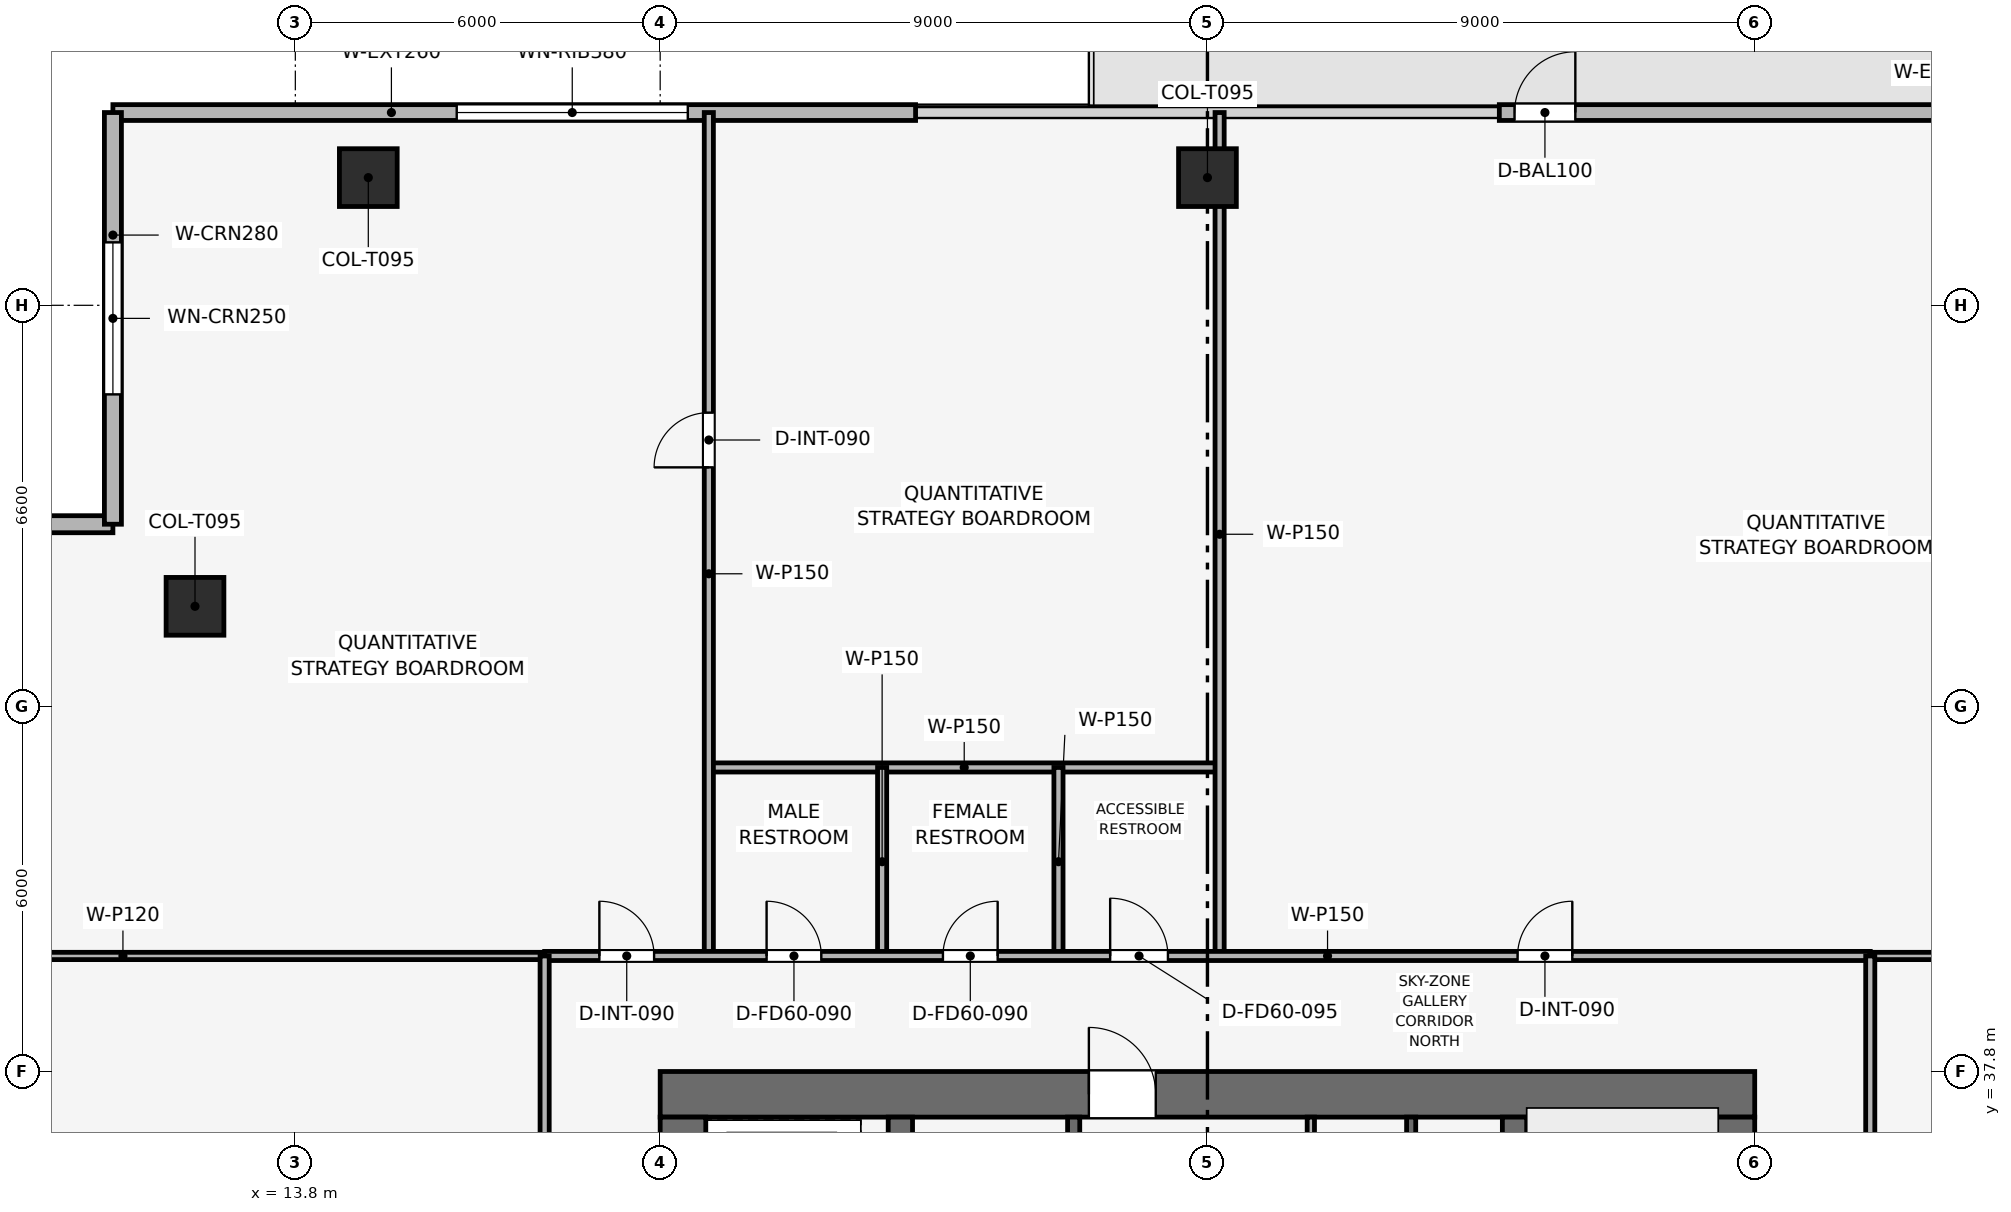
"""IFC4 building model, lengths in metres.
Left out: names, types, materials, properties, quantities, classifications, styles, units other than length and angle.
Written with IfcOpenShell. Run it as: python <this file> out.ifc"""

import sys

from ifc_helpers import new_model, si_unit, direction, frame, frame_2d, origin, origin_2d, place, context, subcontext, project, spatial, rectangle, extrude, element, fill, save


model = new_model("IFC4")
c1 = context("Model", 3, precision=1e-05, world=origin(), true_north=direction((0.0, 1.0)))
c2 = subcontext(c1, "Body", "Model", "MODEL_VIEW")
j1 = project(units=[si_unit("LENGTHUNIT", "METRE"), si_unit("PLANEANGLEUNIT", "RADIAN")], contexts=[c1])
p1 = place(None, origin())
s1 = spatial("IfcSite", under=j1, at=p1, CompositionType="ELEMENT")
p2 = place(p1, origin())
s2 = spatial("IfcBuilding", under=s1, at=p2, CompositionType="ELEMENT")
p3 = place(p2, frame((0.0, 0.0, 265.35)))
s3 = spatial("IfcBuildingStorey", under=s2, at=p3, CompositionType="ELEMENT", Elevation=265.35)
p4 = place(p3, frame((19.8, 37.425, 0.0), z_axis=(0.0, 0.0, 1.0), x_axis=(1.0, 0.0, 0.0)))
e1 = element("IfcWall", 1, at=p4, inside=s3, PredefinedType="SHEAR", context=c2, shape_type="SweptSolid", body=[
    extrude(rectangle(XDim=18.0, YDim=0.75, at=frame_2d((9.0, 0.0))), origin(), (0.0, 0.0, 1.0), 3.75),
])
p5 = place(p4, frame((7.05, 0.0, 0.0)))
e2 = element("IfcOpeningElement", 2, at=p5, cuts=e1, PredefinedType="OPENING", context=c2, shape_type="SweptSolid", body=[
    extrude(rectangle(XDim=1.1, YDim=2.15, at=frame_2d((0.55, 1.075))), frame((0.0, 0.385, 0.0), z_axis=(0.0, -1.0, 0.0), x_axis=(1.0, 0.0, 0.0)), (0.0, 0.0, 1.0), 0.77),
])
p6 = place(p3, frame((20.175, 20.55, 0.0), z_axis=(0.0, 0.0, 1.0), x_axis=(0.0, 1.0, 0.0)))
e3 = element("IfcWall", 3, at=p6, inside=s3, PredefinedType="SHEAR", context=c2, shape_type="SweptSolid", body=[
    extrude(rectangle(XDim=16.5, YDim=0.75, at=frame_2d((8.25, 0.0))), origin(), (0.0, 0.0, 1.0), 3.75),
])
p7 = place(p6, frame((10.25, 0.0, 0.0)))
e4 = element("IfcOpeningElement", 4, at=p7, cuts=e3, PredefinedType="OPENING", context=c2, shape_type="SweptSolid", body=[
    extrude(rectangle(XDim=1.1, YDim=2.15, at=frame_2d((0.55, 1.075))), frame((0.0, 0.385, 0.0), z_axis=(0.0, -1.0, 0.0), x_axis=(1.0, 0.0, 0.0)), (0.0, 0.0, 1.0), 0.77),
])
p8 = place(p3, frame((37.425, 20.55, 0.0), z_axis=(0.0, 0.0, 1.0), x_axis=(0.0, 1.0, 0.0)))
e5 = element("IfcWall", 5, at=p8, inside=s3, PredefinedType="SHEAR", context=c2, shape_type="SweptSolid", body=[
    extrude(rectangle(XDim=16.5, YDim=0.75, at=frame_2d((8.25, 0.0))), origin(), (0.0, 0.0, 1.0), 3.75),
])
p9 = place(p8, frame((4.75, 0.0, 0.0)))
e6 = element("IfcOpeningElement", 6, at=p9, cuts=e5, PredefinedType="OPENING", context=c2, shape_type="SweptSolid", body=[
    extrude(rectangle(XDim=1.1, YDim=2.15, at=frame_2d((0.55, 1.075))), frame((0.0, 0.385, 0.0), z_axis=(0.0, -1.0, 0.0), x_axis=(1.0, 0.0, 0.0)), (0.0, 0.0, 1.0), 0.77),
])
for number, where, z_axis, x_axis in (
    (7, (23.75, 20.55, 0.0), (0.0, 0.0, 1.0), (0.0, 1.0, 0.0)),
    (8, (33.85, 20.55, 0.0), (0.0, 0.0, 1.0), (0.0, 1.0, 0.0)),
):
    element("IfcWall", number, at=place(p3, frame(where, z_axis=z_axis, x_axis=x_axis)), inside=s3, PredefinedType="SHEAR", context=c2, shape_type="SweptSolid", body=[
        extrude(rectangle(XDim=16.5, YDim=0.4, at=frame_2d((8.25, 0.0))), origin(), (0.0, 0.0, 1.0), 3.75),
    ])
for number, where, z_axis, x_axis in (
    (9, (28.8, 52.5, 0.003), (0.0, 0.0, 1.0), (1.0, 0.0, 0.0)),
    (10, (15.0, 52.5, 0.003), (0.0, 0.0, 1.0), (1.0, 0.0, 0.0)),
    (11, (12.15, 45.45, 0.003), (0.0, 0.0, 1.0), (1.0, 0.0, 0.0)),
):
    element("IfcColumn", number, at=place(p3, frame(where, z_axis=z_axis, x_axis=x_axis)), inside=s3, PredefinedType="COLUMN", context=c2, shape_type="SweptSolid", body=[
        extrude(rectangle(XDim=0.95, YDim=0.95, at=origin_2d()), origin(), (0.0, 0.0, 1.0), 3.494),
    ])
p10 = place(p3, frame((10.8, 53.57, 0.0), z_axis=(0.0, 0.0, 1.0), x_axis=(1.0, 0.0, 0.0)))
e12 = element("IfcWall", 12, at=p10, inside=s3, PredefinedType="SOLIDWALL", context=c2, shape_type="SweptSolid", body=[
    extrude(rectangle(XDim=13.2, YDim=0.26, at=frame_2d((6.6, 0.0))), origin(), (0.0, 0.0, 1.0), 3.5),
])
p11 = place(p10, frame((5.654, 0.0, 0.9)))
e13 = element("IfcOpeningElement", 13, at=p11, cuts=e12, PredefinedType="OPENING", context=c2, shape_type="SweptSolid", body=[
    extrude(rectangle(XDim=3.8, YDim=1.9, at=frame_2d((1.9, 0.95))), frame((0.0, 0.14, 0.0), z_axis=(0.0, -1.0, 0.0), x_axis=(1.0, 0.0, 0.0)), (0.0, 0.0, 1.0), 0.28),
])
p12 = place(p3, frame((33.6, 53.57, 0.0), z_axis=(0.0, 0.0, 1.0), x_axis=(1.0, 0.0, 0.0)))
e14 = element("IfcWall", 14, at=p12, inside=s3, PredefinedType="SOLIDWALL", context=c2, shape_type="SweptSolid", body=[
    extrude(rectangle(XDim=13.2, YDim=0.26, at=frame_2d((6.6, 0.0))), origin(), (0.0, 0.0, 1.0), 3.5),
])
p13 = place(p12, frame((0.25, 0.0, 0.0)))
e15 = element("IfcOpeningElement", 15, at=p13, cuts=e14, PredefinedType="OPENING", context=c2, shape_type="SweptSolid", body=[
    extrude(rectangle(XDim=1.0, YDim=2.2, at=frame_2d((0.5, 1.1))), frame((0.0, 0.14, 0.0), z_axis=(0.0, -1.0, 0.0), x_axis=(1.0, 0.0, 0.0)), (0.0, 0.0, 1.0), 0.28),
])
p14 = place(p3, frame((4.03, 46.8, 0.0), z_axis=(0.0, 0.0, 1.0), x_axis=(1.0, 0.0, 0.0)))
e16 = element("IfcWall", 16, at=p14, inside=s3, PredefinedType="SOLIDWALL", context=c2, shape_type="SweptSolid", body=[
    extrude(rectangle(XDim=6.77, YDim=0.28, at=frame_2d((3.385, 0.0))), origin(), (0.0, 0.0, 1.0), 3.5),
])
p15 = place(p14, frame((2.135, 0.0, 0.9)))
e17 = element("IfcOpeningElement", 17, at=p15, cuts=e16, PredefinedType="OPENING", context=c2, shape_type="SweptSolid", body=[
    extrude(rectangle(XDim=2.5, YDim=1.9, at=frame_2d((1.25, 0.95))), frame((0.0, 0.15, 0.0), z_axis=(0.0, -1.0, 0.0), x_axis=(1.0, 0.0, 0.0)), (0.0, 0.0, 1.0), 0.3),
])
p16 = place(p3, frame((10.8, 46.8, 0.0), z_axis=(0.0, 0.0, 1.0), x_axis=(0.0, 1.0, 0.0)))
e18 = element("IfcWall", 18, at=p16, inside=s3, PredefinedType="SOLIDWALL", context=c2, shape_type="SweptSolid", body=[
    extrude(rectangle(XDim=6.77, YDim=0.28, at=frame_2d((3.385, 0.0))), origin(), (0.0, 0.0, 1.0), 3.5),
])
p17 = place(p16, frame((2.135, 0.0, 0.9)))
e19 = element("IfcOpeningElement", 19, at=p17, cuts=e18, PredefinedType="OPENING", context=c2, shape_type="SweptSolid", body=[
    extrude(rectangle(XDim=2.5, YDim=1.9, at=frame_2d((1.25, 0.95))), frame((0.0, 0.15, 0.0), z_axis=(0.0, -1.0, 0.0), x_axis=(1.0, 0.0, 0.0)), (0.0, 0.0, 1.0), 0.3),
])
p18 = place(p3, frame((32.15, 34.0, 0.0), z_axis=(0.0, 0.0, 1.0), x_axis=(0.0, 1.0, 0.0)))
e20 = element("IfcWall", 20, at=p18, inside=s3, PredefinedType="SHEAR", context=c2, shape_type="SweptSolid", body=[
    extrude(rectangle(XDim=3.05, YDim=0.15, at=frame_2d((1.525, 0.0))), origin(), (0.0, 0.0, 1.0), 3.5),
])
p19 = place(p3, frame((26.6, 34.0, 0.0), z_axis=(0.0, 0.0, 1.0), x_axis=(0.0, 1.0, 0.0)))
e21 = element("IfcWall", 21, at=p19, inside=s3, PredefinedType="SHEAR", context=c2, shape_type="SweptSolid", body=[
    extrude(rectangle(XDim=3.05, YDim=0.2, at=frame_2d((1.525, 0.0))), origin(), (0.0, 0.0, 1.0), 3.5),
])
p20 = place(p19, frame((0.75, 0.0, 0.0)))
e22 = element("IfcOpeningElement", 22, at=p20, cuts=e21, PredefinedType="OPENING", context=c2, shape_type="SweptSolid", body=[
    extrude(rectangle(XDim=1.1, YDim=2.15, at=frame_2d((0.55, 1.075))), frame((0.0, 0.11, 0.0), z_axis=(0.0, -1.0, 0.0), x_axis=(1.0, 0.0, 0.0)), (0.0, 0.0, 1.0), 0.22),
])
p21 = place(p3, frame((30.5, 33.925, 0.0), z_axis=(0.0, 0.0, 1.0), x_axis=(0.0, 1.0, 0.0)))
e23 = element("IfcWall", 23, at=p21, inside=s3, PredefinedType="PARTITIONING", context=c2, shape_type="SweptSolid", body=[
    extrude(rectangle(XDim=3.125, YDim=0.12, at=frame_2d((1.562, 0.0))), origin(), (0.0, 0.0, 1.0), 3.5),
])
p22 = place(p21, frame((0.85, 0.0, 0.0)))
e24 = element("IfcOpeningElement", 24, at=p22, cuts=e23, PredefinedType="OPENING", context=c2, shape_type="SweptSolid", body=[
    extrude(rectangle(XDim=0.9, YDim=2.1, at=frame_2d((0.45, 1.05))), frame((0.0, 0.07, 0.0), z_axis=(0.0, -1.0, 0.0), x_axis=(1.0, 0.0, 0.0)), (0.0, 0.0, 1.0), 0.14),
])
p23 = place(p3, frame((20.6, 42.8, 0.0), z_axis=(0.0, 0.0, 1.0), x_axis=(1.0, 0.0, 0.0)))
e25 = element("IfcWall", 25, at=p23, inside=s3, PredefinedType="PARTITIONING", context=c2, shape_type="SweptSolid", body=[
    extrude(rectangle(XDim=8.4, YDim=0.15, at=frame_2d((4.2, 0.0))), origin(), (0.0, 0.0, 1.0), 3.085),
])
p24 = place(p3, frame((20.6, 39.7, 0.0), z_axis=(0.0, 0.0, 1.0), x_axis=(0.0, 1.0, 0.0)))
e26 = element("IfcWall", 26, at=p24, inside=s3, PredefinedType="PARTITIONING", context=c2, shape_type="SweptSolid", body=[
    extrude(rectangle(XDim=13.87, YDim=0.15, at=frame_2d((6.935, 0.0))), origin(), (0.0, 0.0, 1.0), 3.085),
])
p25 = place(p24, frame((8.035, 0.0, 0.0)))
e27 = element("IfcOpeningElement", 27, at=p25, cuts=e26, PredefinedType="OPENING", context=c2, shape_type="SweptSolid", body=[
    extrude(rectangle(XDim=0.9, YDim=2.1, at=frame_2d((0.45, 1.05))), frame((0.0, 0.085, 0.0), z_axis=(0.0, -1.0, 0.0), x_axis=(1.0, 0.0, 0.0)), (0.0, 0.0, 1.0), 0.17),
])
p26 = place(p3, frame((29.0, 39.7, 0.0), z_axis=(0.0, 0.0, 1.0), x_axis=(0.0, 1.0, 0.0)))
e28 = element("IfcWall", 28, at=p26, inside=s3, PredefinedType="PARTITIONING", context=c2, shape_type="SweptSolid", body=[
    extrude(rectangle(XDim=13.87, YDim=0.15, at=frame_2d((6.935, 0.0))), origin(), (0.0, 0.0, 1.0), 2.985),
])
for number, where, z_axis, x_axis in (
    (29, (23.45, 39.7, 0.0), (0.0, 0.0, 1.0), (0.0, 1.0, 0.0)),
    (30, (26.35, 39.7, 0.0), (0.0, 0.0, 1.0), (0.0, 1.0, 0.0)),
):
    element("IfcWall", number, at=place(p3, frame(where, z_axis=z_axis, x_axis=x_axis)), inside=s3, PredefinedType="PARTITIONING", context=c2, shape_type="SweptSolid", body=[
        extrude(rectangle(XDim=3.1, YDim=0.15, at=frame_2d((1.55, 0.0))), origin(), (0.0, 0.0, 1.0), 3.5),
    ])
p27 = place(p3, frame((4.03, 39.7, 0.0), z_axis=(0.0, 0.0, 1.0), x_axis=(1.0, 0.0, 0.0)))
e31 = element("IfcWall", 31, at=p27, inside=s3, PredefinedType="PARTITIONING", context=c2, shape_type="SweptSolid", body=[
    extrude(rectangle(XDim=13.87, YDim=0.12, at=frame_2d((6.935, 0.0))), origin(), (0.0, 0.0, 1.0), 3.085),
])
p28 = place(p3, frame((39.7, 39.7, 0.0), z_axis=(0.0, 0.0, 1.0), x_axis=(1.0, 0.0, 0.0)))
e32 = element("IfcWall", 32, at=p28, inside=s3, PredefinedType="PARTITIONING", context=c2, shape_type="SweptSolid", body=[
    extrude(rectangle(XDim=13.87, YDim=0.12, at=frame_2d((6.935, 0.0))), origin(), (0.0, 0.0, 1.0), 3.085),
])
p29 = place(p3, frame((17.9, 39.7, 0.0), z_axis=(0.0, 0.0, 1.0), x_axis=(1.0, 0.0, 0.0)))
e33 = element("IfcWall", 33, at=p29, inside=s3, PredefinedType="PARTITIONING", context=c2, shape_type="SweptSolid", body=[
    extrude(rectangle(XDim=21.8, YDim=0.15, at=frame_2d((10.9, 0.0))), origin(), (0.0, 0.0, 1.0), 3.085),
])
p30 = place(p29, frame((0.9, 0.0, 0.0)))
e34 = element("IfcOpeningElement", 34, at=p30, cuts=e33, PredefinedType="OPENING", context=c2, shape_type="SweptSolid", body=[
    extrude(rectangle(XDim=0.9, YDim=2.1, at=frame_2d((0.45, 1.05))), frame((0.0, 0.085, 0.0), z_axis=(0.0, -1.0, 0.0), x_axis=(1.0, 0.0, 0.0)), (0.0, 0.0, 1.0), 0.17),
])
p31 = place(p29, frame((3.65, 0.0, 0.0)))
e35 = element("IfcOpeningElement", 35, at=p31, cuts=e33, PredefinedType="OPENING", context=c2, shape_type="SweptSolid", body=[
    extrude(rectangle(XDim=0.9, YDim=2.1, at=frame_2d((0.45, 1.05))), frame((0.0, 0.085, 0.0), z_axis=(0.0, -1.0, 0.0), x_axis=(1.0, 0.0, 0.0)), (0.0, 0.0, 1.0), 0.17),
])
p32 = place(p29, frame((6.55, 0.0, 0.0)))
e36 = element("IfcOpeningElement", 36, at=p32, cuts=e33, PredefinedType="OPENING", context=c2, shape_type="SweptSolid", body=[
    extrude(rectangle(XDim=0.9, YDim=2.1, at=frame_2d((0.45, 1.05))), frame((0.0, 0.085, 0.0), z_axis=(0.0, -1.0, 0.0), x_axis=(1.0, 0.0, 0.0)), (0.0, 0.0, 1.0), 0.17),
])
p33 = place(p29, frame((9.3, 0.0, 0.0)))
e37 = element("IfcOpeningElement", 37, at=p33, cuts=e33, PredefinedType="OPENING", context=c2, shape_type="SweptSolid", body=[
    extrude(rectangle(XDim=0.95, YDim=2.1, at=frame_2d((0.475, 1.05))), frame((0.0, 0.085, 0.0), z_axis=(0.0, -1.0, 0.0), x_axis=(1.0, 0.0, 0.0)), (0.0, 0.0, 1.0), 0.17),
])
p34 = place(p29, frame((16.0, 0.0, 0.0)))
e38 = element("IfcOpeningElement", 38, at=p34, cuts=e33, PredefinedType="OPENING", context=c2, shape_type="SweptSolid", body=[
    extrude(rectangle(XDim=0.9, YDim=2.1, at=frame_2d((0.45, 1.05))), frame((0.0, 0.085, 0.0), z_axis=(0.0, -1.0, 0.0), x_axis=(1.0, 0.0, 0.0)), (0.0, 0.0, 1.0), 0.17),
])
p35 = place(p3, frame((17.9, 10.8, 0.0), z_axis=(0.0, 0.0, 1.0), x_axis=(0.0, 1.0, 0.0)))
e39 = element("IfcWall", 39, at=p35, inside=s3, PredefinedType="PARTITIONING", context=c2, shape_type="SweptSolid", body=[
    extrude(rectangle(XDim=28.9, YDim=0.15, at=frame_2d((14.45, 0.0))), origin(), (0.0, 0.0, 1.0), 3.085),
])
p36 = place(p35, frame((14.0, 0.0, 0.0)))
e40 = element("IfcOpeningElement", 40, at=p36, cuts=e39, PredefinedType="OPENING", context=c2, shape_type="SweptSolid", body=[
    extrude(rectangle(XDim=0.9, YDim=2.1, at=frame_2d((0.45, 1.05))), frame((0.0, 0.085, 0.0), z_axis=(0.0, -1.0, 0.0), x_axis=(1.0, 0.0, 0.0)), (0.0, 0.0, 1.0), 0.17),
])
p37 = place(p3, frame((39.7, 24.4, 0.0), z_axis=(0.0, 0.0, 1.0), x_axis=(0.0, 1.0, 0.0)))
e41 = element("IfcWall", 41, at=p37, inside=s3, PredefinedType="PARTITIONING", context=c2, shape_type="SweptSolid", body=[
    extrude(rectangle(XDim=15.3, YDim=0.15, at=frame_2d((7.65, 0.0))), origin(), (0.0, 0.0, 1.0), 3.085),
])
p38 = place(p37, frame((0.7, 0.0, 0.0)))
e42 = element("IfcOpeningElement", 42, at=p38, cuts=e41, PredefinedType="OPENING", context=c2, shape_type="SweptSolid", body=[
    extrude(rectangle(XDim=0.9, YDim=2.1, at=frame_2d((0.45, 1.05))), frame((0.0, 0.085, 0.0), z_axis=(0.0, -1.0, 0.0), x_axis=(1.0, 0.0, 0.0)), (0.0, 0.0, 1.0), 0.17),
])
p39 = place(p37, frame((4.141, 0.0, 0.0)))
e43 = element("IfcOpeningElement", 43, at=p39, cuts=e41, PredefinedType="OPENING", context=c2, shape_type="SweptSolid", body=[
    extrude(rectangle(XDim=0.9, YDim=2.1, at=frame_2d((0.45, 1.05))), frame((0.0, 0.085, 0.0), z_axis=(0.0, -1.0, 0.0), x_axis=(1.0, 0.0, 0.0)), (0.0, 0.0, 1.0), 0.17),
])
p40 = place(p37, frame((10.641, 0.0, 0.0)))
e44 = element("IfcOpeningElement", 44, at=p40, cuts=e41, PredefinedType="OPENING", context=c2, shape_type="SweptSolid", body=[
    extrude(rectangle(XDim=0.9, YDim=2.1, at=frame_2d((0.45, 1.05))), frame((0.0, 0.085, 0.0), z_axis=(0.0, -1.0, 0.0), x_axis=(1.0, 0.0, 0.0)), (0.0, 0.0, 1.0), 0.17),
])
p41 = place(p13, origin())
e45 = element("IfcDoor", 45, at=p41, inside=s3, OperationType="SINGLE_SWING_RIGHT", PredefinedType="DOOR", context=c2, shape_type="SweptSolid", body=[
    extrude(rectangle(XDim=1.0, YDim=2.2, at=frame_2d((0.5, 1.1))), frame((0.0, 0.025, 0.0), z_axis=(0.0, -1.0, 0.0), x_axis=(1.0, 0.0, 0.0)), (0.0, 0.0, 1.0), 0.05),
])
fill(e15, e45)
p42 = place(p11, origin())
e46 = element("IfcWindow", 46, at=p42, inside=s3, PartitioningType="SINGLE_PANEL", PredefinedType="WINDOW", context=c2, shape_type="SweptSolid", body=[
    extrude(rectangle(XDim=3.8, YDim=1.9, at=frame_2d((1.9, 0.95))), frame((0.0, 0.03, 0.0), z_axis=(0.0, -1.0, 0.0), x_axis=(1.0, 0.0, 0.0)), (0.0, 0.0, 1.0), 0.06),
])
fill(e13, e46)
p43 = place(p17, origin())
e47 = element("IfcWindow", 47, at=p43, inside=s3, PartitioningType="SINGLE_PANEL", PredefinedType="WINDOW", context=c2, shape_type="SweptSolid", body=[
    extrude(rectangle(XDim=2.5, YDim=1.9, at=frame_2d((1.25, 0.95))), frame((0.0, 0.03, 0.0), z_axis=(0.0, -1.0, 0.0), x_axis=(1.0, 0.0, 0.0)), (0.0, 0.0, 1.0), 0.06),
])
fill(e19, e47)
p44 = place(p25, origin())
e48 = element("IfcDoor", 48, at=p44, inside=s3, OperationType="SINGLE_SWING_LEFT", PredefinedType="DOOR", context=c2, shape_type="SweptSolid", body=[
    extrude(rectangle(XDim=0.9, YDim=2.1, at=frame_2d((0.45, 1.05))), frame((0.0, 0.025, 0.0), z_axis=(0.0, -1.0, 0.0), x_axis=(1.0, 0.0, 0.0)), (0.0, 0.0, 1.0), 0.05),
])
fill(e27, e48)
p45 = place(p30, origin())
e49 = element("IfcDoor", 49, at=p45, inside=s3, OperationType="SINGLE_SWING_LEFT", PredefinedType="DOOR", context=c2, shape_type="SweptSolid", body=[
    extrude(rectangle(XDim=0.9, YDim=2.1, at=frame_2d((0.45, 1.05))), frame((0.0, 0.025, 0.0), z_axis=(0.0, -1.0, 0.0), x_axis=(1.0, 0.0, 0.0)), (0.0, 0.0, 1.0), 0.05),
])
fill(e34, e49)
p46 = place(p31, origin())
e50 = element("IfcDoor", 50, at=p46, inside=s3, OperationType="SINGLE_SWING_LEFT", PredefinedType="DOOR", context=c2, shape_type="SweptSolid", body=[
    extrude(rectangle(XDim=0.9, YDim=2.1, at=frame_2d((0.45, 1.05))), frame((0.0, 0.025, 0.0), z_axis=(0.0, -1.0, 0.0), x_axis=(1.0, 0.0, 0.0)), (0.0, 0.0, 1.0), 0.05),
])
fill(e35, e50)
p47 = place(p32, origin())
e51 = element("IfcDoor", 51, at=p47, inside=s3, OperationType="SINGLE_SWING_RIGHT", PredefinedType="DOOR", context=c2, shape_type="SweptSolid", body=[
    extrude(rectangle(XDim=0.9, YDim=2.1, at=frame_2d((0.45, 1.05))), frame((0.0, 0.025, 0.0), z_axis=(0.0, -1.0, 0.0), x_axis=(1.0, 0.0, 0.0)), (0.0, 0.0, 1.0), 0.05),
])
fill(e36, e51)
p48 = place(p33, origin())
e52 = element("IfcDoor", 52, at=p48, inside=s3, OperationType="SINGLE_SWING_LEFT", PredefinedType="DOOR", context=c2, shape_type="SweptSolid", body=[
    extrude(rectangle(XDim=0.95, YDim=2.1, at=frame_2d((0.475, 1.05))), frame((0.0, 0.025, 0.0), z_axis=(0.0, -1.0, 0.0), x_axis=(1.0, 0.0, 0.0)), (0.0, 0.0, 1.0), 0.05),
])
fill(e37, e52)
p49 = place(p34, origin())
e53 = element("IfcDoor", 53, at=p49, inside=s3, OperationType="SINGLE_SWING_RIGHT", PredefinedType="DOOR", context=c2, shape_type="SweptSolid", body=[
    extrude(rectangle(XDim=0.9, YDim=2.1, at=frame_2d((0.45, 1.05))), frame((0.0, 0.025, 0.0), z_axis=(0.0, -1.0, 0.0), x_axis=(1.0, 0.0, 0.0)), (0.0, 0.0, 1.0), 0.05),
])
fill(e38, e53)
p50 = place(p5, origin())
e54 = element("IfcDoor", 54, at=p50, inside=s3, OperationType="SINGLE_SWING_LEFT", PredefinedType="DOOR", context=c2, shape_type="SweptSolid", body=[
    extrude(rectangle(XDim=1.1, YDim=2.15, at=frame_2d((0.55, 1.075))), frame((0.0, 0.025, 0.0), z_axis=(0.0, -1.0, 0.0), x_axis=(1.0, 0.0, 0.0)), (0.0, 0.0, 1.0), 0.05),
])
fill(e2, e54)
save(model, sys.argv[1])
